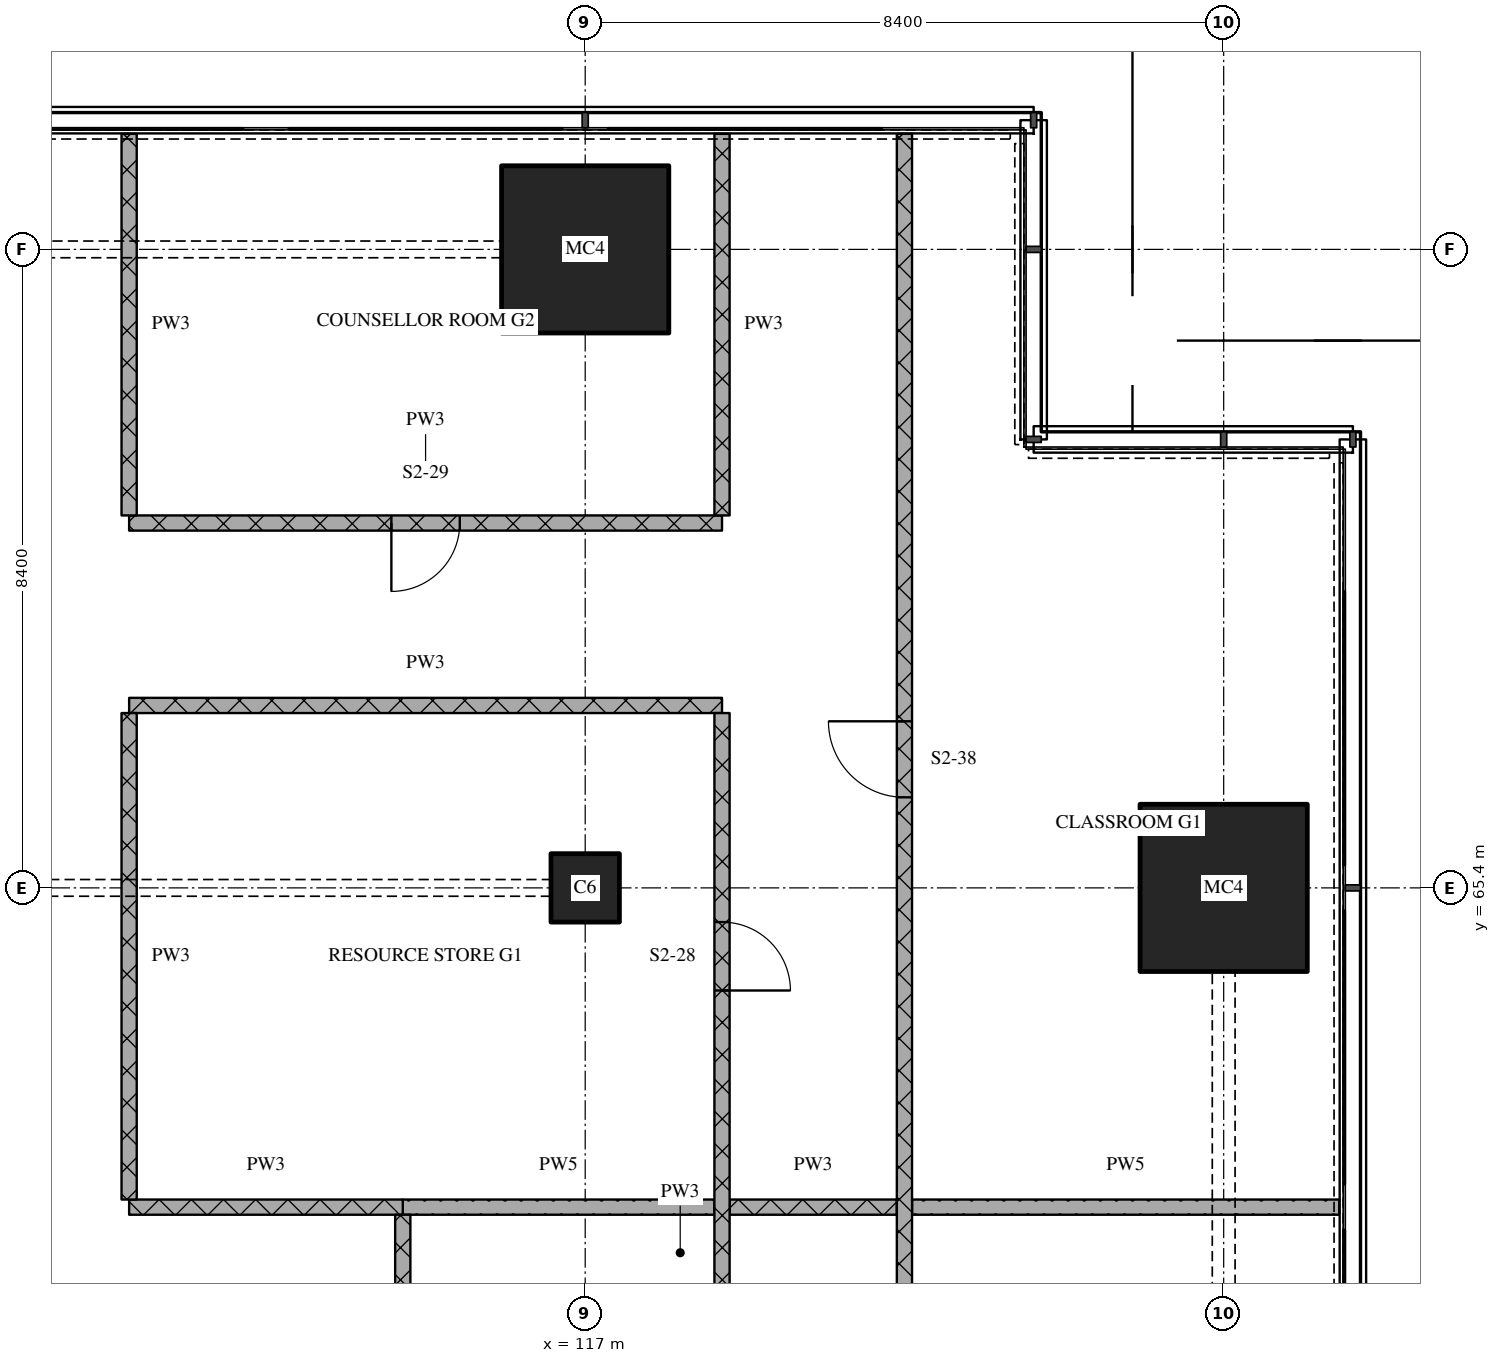
"""IFC4 building model, lengths in metres.
Left out: names, types, materials, properties, quantities, classifications, styles, units other than length and angle.
Written with IfcOpenShell. Run it as: python <this file> out.ifc"""

import sys

from ifc_helpers import new_model, si_unit, direction, frame, frame_2d, origin, origin_2d, place, context, subcontext, project, spatial, rectangle, extrude, element, fill, save


model = new_model("IFC4")
c1 = context("Model", 3, precision=1e-05, world=origin(), true_north=direction((0.0, 1.0)))
c2 = subcontext(c1, "Body", "Model", "MODEL_VIEW")
j1 = project(units=[si_unit("LENGTHUNIT", "METRE"), si_unit("PLANEANGLEUNIT", "RADIAN")], contexts=[c1])
p1 = place(None, origin())
s1 = spatial("IfcSite", under=j1, at=p1, CompositionType="ELEMENT")
p2 = place(p1, origin())
s2 = spatial("IfcBuilding", under=s1, at=p2, CompositionType="ELEMENT")
p3 = place(p2, frame((0.0, 0.0, 32.7)))
s3 = spatial("IfcBuildingStorey", under=s2, at=p3, CompositionType="ELEMENT", Elevation=32.7)
p4 = place(p3, frame((117.0, 65.4, 0.0), z_axis=(0.0, 0.0, 1.0), x_axis=(1.0, 0.0, 0.0)))
e1 = element("IfcColumn", 1, at=p4, inside=s3, PredefinedType="COLUMN", context=c2, shape_type="SweptSolid", body=[
    extrude(rectangle(XDim=0.9, YDim=0.9, at=origin_2d()), origin(), (0.0, 0.0, 1.0), 4.5),
])
for number, where, z_axis, x_axis in (
    (2, (117.0, 73.8, 0.0), (0.0, 0.0, 1.0), (1.0, 0.0, 0.0)),
    (3, (125.4, 65.4, 0.0), (0.0, 0.0, 1.0), (1.0, 0.0, 0.0)),
):
    element("IfcColumn", number, at=place(p3, frame(where, z_axis=z_axis, x_axis=x_axis)), inside=s3, PredefinedType="COLUMN", context=c2, shape_type="SweptSolid", body=[
        extrude(rectangle(XDim=2.2, YDim=2.2, at=origin_2d()), origin(), (0.0, 0.0, 1.0), 4.5),
    ])
p5 = place(p3, frame((111.0, 61.2, 0.0), z_axis=(0.0, 0.0, 1.0), x_axis=(1.0, 0.0, 0.0)))
e4 = element("IfcWall", 4, at=p5, inside=s3, PredefinedType="PARTITIONING", context=c2, shape_type="SweptSolid", body=[
    extrude(rectangle(XDim=3.6, YDim=0.2, at=frame_2d((1.8, 0.0))), origin(), (0.0, 0.0, 1.0), 4.22),
])
p6 = place(p3, frame((118.9, 61.2, 0.0), z_axis=(0.0, 0.0, 1.0), x_axis=(1.0, 0.0, 0.0)))
e5 = element("IfcWall", 5, at=p6, inside=s3, PredefinedType="PARTITIONING", context=c2, shape_type="SweptSolid", body=[
    extrude(rectangle(XDim=2.2, YDim=0.2, at=frame_2d((1.1, 0.0))), origin(), (0.0, 0.0, 1.0), 4.22),
])
p7 = place(p3, frame((114.6, 61.2, 0.0), z_axis=(0.0, 0.0, 1.0), x_axis=(1.0, 0.0, 0.0)))
e6 = element("IfcWall", 6, at=p7, inside=s3, PredefinedType="PARTITIONING", context=c2, shape_type="SweptSolid", body=[
    extrude(rectangle(XDim=4.1, YDim=0.2, at=frame_2d((2.05, 0.0))), origin(), (0.0, 0.0, 1.0), 4.22),
])
p8 = place(p3, frame((121.3, 61.2, 0.0), z_axis=(0.0, 0.0, 1.0), x_axis=(1.0, 0.0, 0.0)))
e7 = element("IfcWall", 7, at=p8, inside=s3, PredefinedType="PARTITIONING", context=c2, shape_type="SweptSolid", body=[
    extrude(rectangle(XDim=5.62, YDim=0.2, at=frame_2d((2.81, 0.0))), origin(), (0.0, 0.0, 1.0), 4.22),
])
p9 = place(p3, frame((111.0, 67.8, 0.0), z_axis=(0.0, 0.0, 1.0), x_axis=(1.0, 0.0, 0.0)))
e8 = element("IfcWall", 8, at=p9, inside=s3, PredefinedType="PARTITIONING", context=c2, shape_type="SweptSolid", body=[
    extrude(rectangle(XDim=7.8, YDim=0.2, at=frame_2d((3.9, 0.0))), origin(), (0.0, 0.0, 1.0), 4.22),
])
p10 = place(p3, frame((111.0, 70.2, 0.0), z_axis=(0.0, 0.0, 1.0), x_axis=(1.0, 0.0, 0.0)))
e9 = element("IfcWall", 9, at=p10, inside=s3, PredefinedType="PARTITIONING", context=c2, shape_type="SweptSolid", body=[
    extrude(rectangle(XDim=7.8, YDim=0.2, at=frame_2d((3.9, 0.0))), origin(), (0.0, 0.0, 1.0), 4.22),
])
p11 = place(p10, frame((3.45, 0.0, 0.0)))
e10 = element("IfcOpeningElement", 10, at=p11, cuts=e9, PredefinedType="OPENING", context=c2, shape_type="SweptSolid", body=[
    extrude(rectangle(XDim=0.9, YDim=2.1, at=frame_2d((0.45, 1.05))), frame((0.0, 0.11, 0.0), z_axis=(0.0, -1.0, 0.0), x_axis=(1.0, 0.0, 0.0)), (0.0, 0.0, 1.0), 0.22),
])
p12 = place(p3, frame((111.0, 67.7, 0.0), z_axis=(0.0, 0.0, 1.0), x_axis=(0.0, -1.0, 0.0)))
e11 = element("IfcWall", 11, at=p12, inside=s3, PredefinedType="PARTITIONING", context=c2, shape_type="SweptSolid", body=[
    extrude(rectangle(XDim=6.4, YDim=0.2, at=frame_2d((3.2, 0.0))), origin(), (0.0, 0.0, 1.0), 4.22),
])
p13 = place(p3, frame((111.0, 75.32, 0.0), z_axis=(0.0, 0.0, 1.0), x_axis=(0.0, -1.0, 0.0)))
e12 = element("IfcWall", 12, at=p13, inside=s3, PredefinedType="PARTITIONING", context=c2, shape_type="SweptSolid", body=[
    extrude(rectangle(XDim=5.02, YDim=0.2, at=frame_2d((2.51, 0.0))), origin(), (0.0, 0.0, 1.0), 4.22),
])
p14 = place(p3, frame((114.6, 61.1, 0.0), z_axis=(0.0, 0.0, 1.0), x_axis=(0.0, -1.0, 0.0)))
e13 = element("IfcWall", 13, at=p14, inside=s3, PredefinedType="PARTITIONING", context=c2, shape_type="SweptSolid", body=[
    extrude(rectangle(XDim=7.6, YDim=0.2, at=frame_2d((3.8, 0.0))), origin(), (0.0, 0.0, 1.0), 4.22),
])
p15 = place(p3, frame((118.8, 53.5, 0.0), z_axis=(0.0, 0.0, 1.0), x_axis=(0.0, 1.0, 0.0)))
e14 = element("IfcWall", 14, at=p15, inside=s3, PredefinedType="PARTITIONING", context=c2, shape_type="SweptSolid", body=[
    extrude(rectangle(XDim=14.2, YDim=0.2, at=frame_2d((7.1, 0.0))), origin(), (0.0, 0.0, 1.0), 4.22),
])
p16 = place(p15, frame((5.75, 0.0, 0.0)))
e15 = element("IfcOpeningElement", 15, at=p16, cuts=e14, PredefinedType="OPENING", context=c2, shape_type="SweptSolid", body=[
    extrude(rectangle(XDim=0.9, YDim=2.1, at=frame_2d((0.45, 1.05))), frame((0.0, 0.11, 0.0), z_axis=(0.0, -1.0, 0.0), x_axis=(1.0, 0.0, 0.0)), (0.0, 0.0, 1.0), 0.22),
])
p17 = place(p15, frame((10.55, 0.0, 0.0)))
e16 = element("IfcOpeningElement", 16, at=p17, cuts=e14, PredefinedType="OPENING", context=c2, shape_type="SweptSolid", body=[
    extrude(rectangle(XDim=0.9, YDim=2.1, at=frame_2d((0.45, 1.05))), frame((0.0, 0.11, 0.0), z_axis=(0.0, -1.0, 0.0), x_axis=(1.0, 0.0, 0.0)), (0.0, 0.0, 1.0), 0.22),
])
p18 = place(p3, frame((118.8, 75.32, 0.0), z_axis=(0.0, 0.0, 1.0), x_axis=(0.0, -1.0, 0.0)))
e17 = element("IfcWall", 17, at=p18, inside=s3, PredefinedType="PARTITIONING", context=c2, shape_type="SweptSolid", body=[
    extrude(rectangle(XDim=5.02, YDim=0.2, at=frame_2d((2.51, 0.0))), origin(), (0.0, 0.0, 1.0), 4.22),
])
p19 = place(p3, frame((121.2, 75.32, 0.0), z_axis=(0.0, 0.0, 1.0), x_axis=(0.0, -1.0, 0.0)))
e18 = element("IfcWall", 18, at=p19, inside=s3, PredefinedType="PARTITIONING", context=c2, shape_type="SweptSolid", body=[
    extrude(rectangle(XDim=32.02, YDim=0.2, at=frame_2d((16.01, 0.0))), origin(), (0.0, 0.0, 1.0), 4.22),
])
p20 = place(p19, frame((7.729, 0.0, 0.0)))
e19 = element("IfcOpeningElement", 19, at=p20, cuts=e18, PredefinedType="OPENING", context=c2, shape_type="SweptSolid", body=[
    extrude(rectangle(XDim=1.0, YDim=2.1, at=frame_2d((0.5, 1.05))), frame((0.0, 0.11, 0.0), z_axis=(0.0, -1.0, 0.0), x_axis=(1.0, 0.0, 0.0)), (0.0, 0.0, 1.0), 0.22),
])
p21 = place(p19, frame((22.62, 0.0, 0.0)))
e20 = element("IfcOpeningElement", 20, at=p21, cuts=e18, PredefinedType="OPENING", context=c2, shape_type="SweptSolid", body=[
    extrude(rectangle(XDim=1.0, YDim=2.1, at=frame_2d((0.5, 1.05))), frame((0.0, 0.11, 0.0), z_axis=(0.0, -1.0, 0.0), x_axis=(1.0, 0.0, 0.0)), (0.0, 0.0, 1.0), 0.22),
])
p22 = place(p11, origin())
e21 = element("IfcDoor", 21, at=p22, inside=s3, OperationType="SINGLE_SWING_RIGHT", PredefinedType="DOOR", context=c2, shape_type="SweptSolid", body=[
    extrude(rectangle(XDim=0.9, YDim=2.1, at=frame_2d((0.45, 1.05))), frame((0.0, 0.025, 0.0), z_axis=(0.0, -1.0, 0.0), x_axis=(1.0, 0.0, 0.0)), (0.0, 0.0, 1.0), 0.05),
])
fill(e10, e21)
p23 = place(p17, origin())
e22 = element("IfcDoor", 22, at=p23, inside=s3, OperationType="SINGLE_SWING_RIGHT", PredefinedType="DOOR", context=c2, shape_type="SweptSolid", body=[
    extrude(rectangle(XDim=0.9, YDim=2.1, at=frame_2d((0.45, 1.05))), frame((0.0, 0.025, 0.0), z_axis=(0.0, -1.0, 0.0), x_axis=(1.0, 0.0, 0.0)), (0.0, 0.0, 1.0), 0.05),
])
fill(e16, e22)
p24 = place(p20, origin())
e23 = element("IfcDoor", 23, at=p24, inside=s3, OperationType="SINGLE_SWING_RIGHT", PredefinedType="DOOR", context=c2, shape_type="SweptSolid", body=[
    extrude(rectangle(XDim=1.0, YDim=2.1, at=frame_2d((0.5, 1.05))), frame((0.0, 0.025, 0.0), z_axis=(0.0, -1.0, 0.0), x_axis=(1.0, 0.0, 0.0)), (0.0, 0.0, 1.0), 0.05),
])
fill(e19, e23)
save(model, sys.argv[1])
